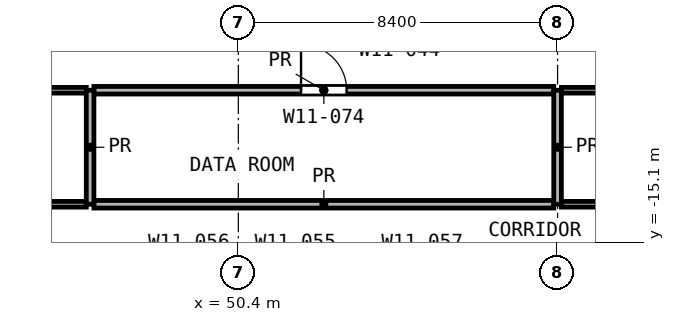
"""IFC4 building model, lengths in metres.
Left out: names, types, materials, properties, quantities, classifications, styles, units other than length and angle.
Written with IfcOpenShell. Run it as: python <this file> out.ifc"""

import sys

from ifc_helpers import new_model, si_unit, direction, frame, frame_2d, origin, place, context, subcontext, project, spatial, rectangle, extrude, element, fill, save


model = new_model("IFC4")
c1 = context("Model", 3, precision=1e-05, world=origin(), true_north=direction((0.0, 1.0)))
c2 = subcontext(c1, "Body", "Model", "MODEL_VIEW")
j1 = project(units=[si_unit("LENGTHUNIT", "METRE"), si_unit("PLANEANGLEUNIT", "RADIAN")], contexts=[c1])
p1 = place(None, origin())
s1 = spatial("IfcSite", under=j1, at=p1, CompositionType="ELEMENT")
p2 = place(p1, origin())
s2 = spatial("IfcBuilding", under=s1, at=p2, CompositionType="ELEMENT")
p3 = place(p2, frame((0.0, 0.0, 72.8)))
s3 = spatial("IfcBuildingStorey", under=s2, at=p3, CompositionType="ELEMENT", Elevation=72.8)
p4 = place(p3, frame((29.475, -14.1, 0.0), z_axis=(0.0, 0.0, 1.0), x_axis=(1.0, 0.0, 0.0)))
e1 = element("IfcWall", 1, at=p4, inside=s3, PredefinedType="PARTITIONING", context=c2, shape_type="SweptSolid", body=[
    extrude(rectangle(XDim=16.925, YDim=0.15, at=frame_2d((8.462, 0.0))), origin(), (0.0, 0.0, 1.0), 3.9),
])
p5 = place(p4, frame((9.225, 0.0, 0.0)))
e2 = element("IfcOpeningElement", 2, at=p5, cuts=e1, PredefinedType="OPENING", context=c2, shape_type="SweptSolid", body=[
    extrude(rectangle(XDim=1.2, YDim=2.1, at=frame_2d((0.6, 1.05))), frame((0.0, 0.085, 0.0), z_axis=(0.0, -1.0, 0.0), x_axis=(1.0, 0.0, 0.0)), (0.0, 0.0, 1.0), 0.17),
])
p6 = place(p3, frame((58.9, -14.1, 0.0), z_axis=(0.0, 0.0, 1.0), x_axis=(1.0, 0.0, 0.0)))
e3 = element("IfcWall", 3, at=p6, inside=s3, PredefinedType="PARTITIONING", context=c2, shape_type="SweptSolid", body=[
    extrude(rectangle(XDim=18.125, YDim=0.15, at=frame_2d((9.062, 0.0))), origin(), (0.0, 0.0, 1.0), 3.9),
])
p7 = place(p6, frame((5.9, 0.0, 0.0)))
e4 = element("IfcOpeningElement", 4, at=p7, cuts=e3, PredefinedType="OPENING", context=c2, shape_type="SweptSolid", body=[
    extrude(rectangle(XDim=1.2, YDim=2.1, at=frame_2d((0.6, 1.05))), frame((0.0, 0.085, 0.0), z_axis=(0.0, -1.0, 0.0), x_axis=(1.0, 0.0, 0.0)), (0.0, 0.0, 1.0), 0.17),
])
p8 = place(p6, frame((14.45, 0.0, 0.0)))
e5 = element("IfcOpeningElement", 5, at=p8, cuts=e3, PredefinedType="OPENING", context=c2, shape_type="SweptSolid", body=[
    extrude(rectangle(XDim=0.9, YDim=2.1, at=frame_2d((0.45, 1.05))), frame((0.0, 0.085, 0.0), z_axis=(0.0, -1.0, 0.0), x_axis=(1.0, 0.0, 0.0)), (0.0, 0.0, 1.0), 0.17),
])
p9 = place(p3, frame((29.475, -11.1, 0.0), z_axis=(0.0, 0.0, 1.0), x_axis=(1.0, 0.0, 0.0)))
e6 = element("IfcWall", 6, at=p9, inside=s3, PredefinedType="PARTITIONING", context=c2, shape_type="SweptSolid", body=[
    extrude(rectangle(XDim=16.925, YDim=0.15, at=frame_2d((8.462, 0.0))), origin(), (0.0, 0.0, 1.0), 3.9),
])
p10 = place(p3, frame((58.9, -11.1, 0.0), z_axis=(0.0, 0.0, 1.0), x_axis=(1.0, 0.0, 0.0)))
e7 = element("IfcWall", 7, at=p10, inside=s3, PredefinedType="PARTITIONING", context=c2, shape_type="SweptSolid", body=[
    extrude(rectangle(XDim=18.125, YDim=0.15, at=frame_2d((9.062, 0.0))), origin(), (0.0, 0.0, 1.0), 3.9),
])
p11 = place(p3, frame((46.6, -14.1, 0.0), z_axis=(0.0, 0.0, 1.0), x_axis=(1.0, 0.0, 0.0)))
e8 = element("IfcWall", 8, at=p11, inside=s3, PredefinedType="PARTITIONING", context=c2, shape_type="SweptSolid", body=[
    extrude(rectangle(XDim=12.1, YDim=0.2, at=frame_2d((6.05, 0.0))), origin(), (0.0, 0.0, 1.0), 3.9),
])
p12 = place(p3, frame((46.6, -11.1, 0.0), z_axis=(0.0, 0.0, 1.0), x_axis=(1.0, 0.0, 0.0)))
e9 = element("IfcWall", 9, at=p12, inside=s3, PredefinedType="PARTITIONING", context=c2, shape_type="SweptSolid", body=[
    extrude(rectangle(XDim=12.1, YDim=0.2, at=frame_2d((6.05, 0.0))), origin(), (0.0, 0.0, 1.0), 3.9),
])
p13 = place(p12, frame((5.45, 0.0, 0.0)))
e10 = element("IfcOpeningElement", 10, at=p13, cuts=e9, PredefinedType="OPENING", context=c2, shape_type="SweptSolid", body=[
    extrude(rectangle(XDim=1.2, YDim=2.1, at=frame_2d((0.6, 1.05))), frame((0.0, 0.11, 0.0), z_axis=(0.0, -1.0, 0.0), x_axis=(1.0, 0.0, 0.0)), (0.0, 0.0, 1.0), 0.22),
])
for number, where, z_axis, x_axis in (
    (11, (46.5, -14.1, 0.0), (0.0, 0.0, 1.0), (0.0, 1.0, 0.0)),
    (12, (58.8, -14.1, 0.0), (0.0, 0.0, 1.0), (0.0, 1.0, 0.0)),
):
    element("IfcWall", number, at=place(p3, frame(where, z_axis=z_axis, x_axis=x_axis)), inside=s3, PredefinedType="PARTITIONING", context=c2, shape_type="SweptSolid", body=[
        extrude(rectangle(XDim=3.0, YDim=0.2, at=frame_2d((1.5, 0.0))), origin(), (0.0, 0.0, 1.0), 3.9),
    ])
p14 = place(p13, origin())
e13 = element("IfcDoor", 13, at=p14, inside=s3, OperationType="SINGLE_SWING_LEFT", PredefinedType="DOOR", context=c2, shape_type="SweptSolid", body=[
    extrude(rectangle(XDim=1.2, YDim=2.1, at=frame_2d((0.6, 1.05))), frame((0.0, 0.025, 0.0), z_axis=(0.0, -1.0, 0.0), x_axis=(1.0, 0.0, 0.0)), (0.0, 0.0, 1.0), 0.05),
])
fill(e10, e13)
save(model, sys.argv[1])
